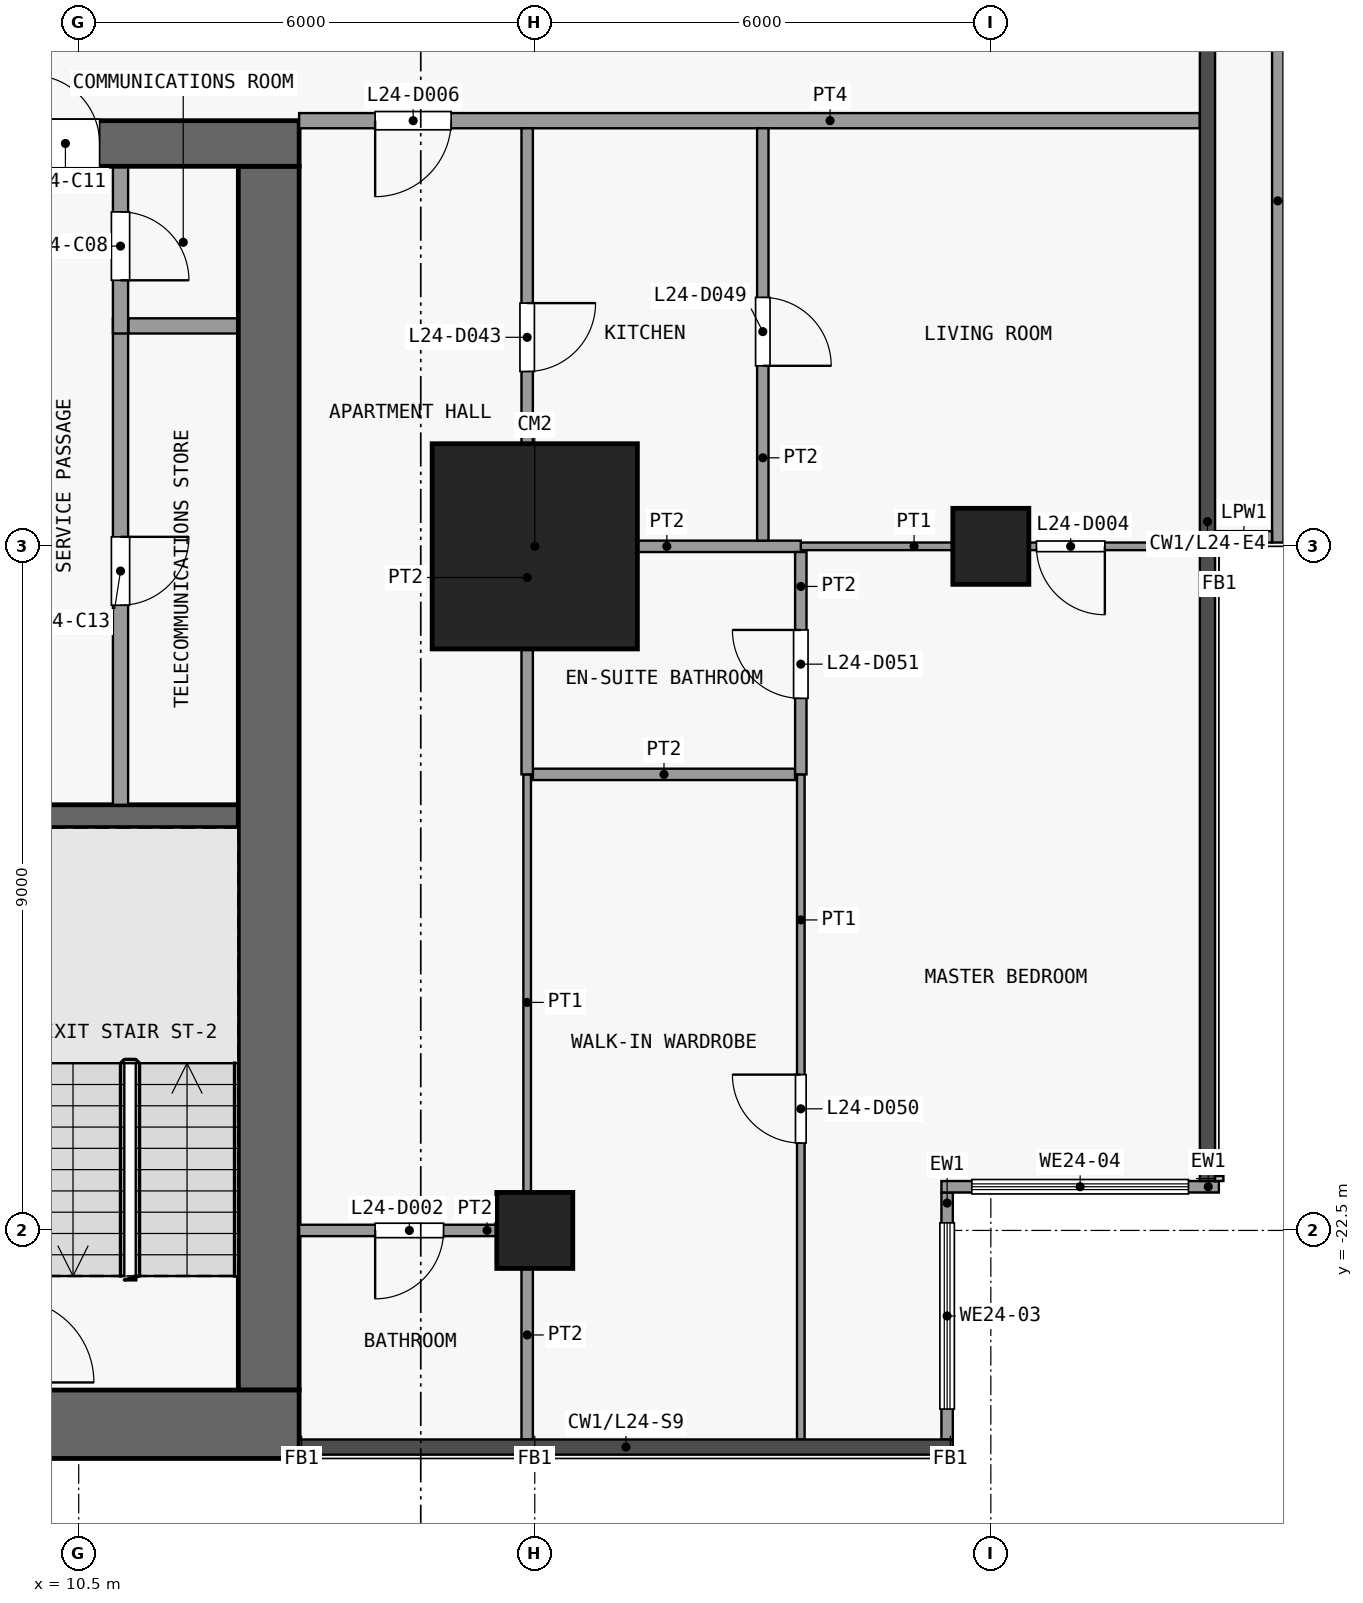
"""IFC4 building model, lengths in metres.
Left out: names, types, materials, properties, quantities, classifications, styles, units other than length and angle.
Written with IfcOpenShell. Run it as: python <this file> out.ifc"""

import sys

from ifc_helpers import new_model, si_unit, direction, frame, frame_2d, origin, origin_2d, place, context, subcontext, project, spatial, rectangle, extrude, element, fill, save


model = new_model("IFC4")
c1 = context("Model", 3, precision=1e-05, world=origin(), true_north=direction((0.0, 1.0)))
c2 = subcontext(c1, "Body", "Model", "MODEL_VIEW")
j1 = project(units=[si_unit("LENGTHUNIT", "METRE"), si_unit("PLANEANGLEUNIT", "RADIAN")], contexts=[c1])
p1 = place(None, origin())
s1 = spatial("IfcSite", under=j1, at=p1, CompositionType="ELEMENT")
p2 = place(p1, origin())
s2 = spatial("IfcBuilding", under=s1, at=p2, CompositionType="ELEMENT")
p3 = place(p2, frame((0.0, 0.0, 99.1)))
s3 = spatial("IfcBuildingStorey", under=s2, at=p3, CompositionType="ELEMENT", Elevation=99.1)
p4 = place(p3, frame((16.5, -22.5, 0.0), z_axis=(0.0, 0.0, 1.0), x_axis=(1.0, 0.0, 0.0)))
e1 = element("IfcColumn", 1, at=p4, inside=s3, PredefinedType="COLUMN", context=c2, shape_type="SweptSolid", body=[
    extrude(rectangle(XDim=1.0, YDim=1.0, at=origin_2d()), origin(), (0.0, 0.0, 1.0), 3.6),
])
p5 = place(p3, frame((16.5, -13.5, 0.0), z_axis=(0.0, 0.0, 1.0), x_axis=(1.0, 0.0, 0.0)))
e2 = element("IfcColumn", 2, at=p5, inside=s3, PredefinedType="COLUMN", context=c2, shape_type="SweptSolid", body=[
    extrude(rectangle(XDim=2.7, YDim=2.7, at=origin_2d()), origin(), (0.0, 0.0, 1.0), 3.6),
])
p6 = place(p3, frame((22.5, -13.5, 0.0), z_axis=(0.0, 0.0, 1.0), x_axis=(1.0, 0.0, 0.0)))
e3 = element("IfcColumn", 3, at=p6, inside=s3, PredefinedType="COLUMN", context=c2, shape_type="SweptSolid", body=[
    extrude(rectangle(XDim=1.0, YDim=1.0, at=origin_2d()), origin(), (0.0, 0.0, 1.0), 3.6),
])
p7 = place(p3, frame((-13.4, -25.05, 0.0), z_axis=(0.0, 0.0, 1.0), x_axis=(1.0, 0.0, 0.0)))
e4 = element("IfcWall", 4, at=p7, inside=s3, PredefinedType="SHEAR", context=c2, shape_type="SweptSolid", body=[
    extrude(rectangle(XDim=26.8, YDim=0.9, at=frame_2d((13.4, 0.0))), origin(), (0.0, 0.0, 1.0), 3.3),
])
p8 = place(p3, frame((-13.4, -8.2, 0.0), z_axis=(0.0, 0.0, 1.0), x_axis=(1.0, 0.0, 0.0)))
e5 = element("IfcWall", 5, at=p8, inside=s3, PredefinedType="SHEAR", context=c2, shape_type="SweptSolid", body=[
    extrude(rectangle(XDim=26.8, YDim=0.6, at=frame_2d((13.4, 0.0))), origin(), (0.0, 0.0, 1.0), 3.3),
])
p9 = place(p8, frame((7.7, 0.0, 0.0)))
e6 = element("IfcOpeningElement", 6, at=p9, cuts=e5, PredefinedType="OPENING", context=c2, shape_type="SweptSolid", body=[
    extrude(rectangle(XDim=1.8, YDim=2.1, at=frame_2d((0.9, 1.05))), frame((0.0, 0.31, 0.0), z_axis=(0.0, -1.0, 0.0), x_axis=(1.0, 0.0, 0.0)), (0.0, 0.0, 1.0), 0.62),
])
p10 = place(p8, frame((17.3, 0.0, 0.0)))
e7 = element("IfcOpeningElement", 7, at=p10, cuts=e5, PredefinedType="OPENING", context=c2, shape_type="SweptSolid", body=[
    extrude(rectangle(XDim=1.8, YDim=2.1, at=frame_2d((0.9, 1.05))), frame((0.0, 0.31, 0.0), z_axis=(0.0, -1.0, 0.0), x_axis=(1.0, 0.0, 0.0)), (0.0, 0.0, 1.0), 0.62),
])
p11 = place(p8, frame((2.625, 0.0, 0.0)))
e8 = element("IfcOpeningElement", 8, at=p11, cuts=e5, PredefinedType="OPENING", context=c2, shape_type="SweptSolid", body=[
    extrude(rectangle(XDim=0.9, YDim=2.1, at=frame_2d((0.45, 1.05))), frame((0.0, 0.31, 0.0), z_axis=(0.0, -1.0, 0.0), x_axis=(1.0, 0.0, 0.0)), (0.0, 0.0, 1.0), 0.62),
])
p12 = place(p8, frame((23.275, 0.0, 0.0)))
e9 = element("IfcOpeningElement", 9, at=p12, cuts=e5, PredefinedType="OPENING", context=c2, shape_type="SweptSolid", body=[
    extrude(rectangle(XDim=0.9, YDim=2.1, at=frame_2d((0.45, 1.05))), frame((0.0, 0.31, 0.0), z_axis=(0.0, -1.0, 0.0), x_axis=(1.0, 0.0, 0.0)), (0.0, 0.0, 1.0), 0.62),
])
p13 = place(p3, frame((13.0, -24.6, 0.0), z_axis=(0.0, 0.0, 1.0), x_axis=(0.0, 1.0, 0.0)))
e10 = element("IfcWall", 10, at=p13, inside=s3, PredefinedType="SHEAR", context=c2, shape_type="SweptSolid", body=[
    extrude(rectangle(XDim=16.1, YDim=0.8, at=frame_2d((8.05, 0.0))), origin(), (0.0, 0.0, 1.0), 3.3),
])
p14 = place(p3, frame((9.5, -17.05, 0.0), z_axis=(0.0, 0.0, 1.0), x_axis=(1.0, 0.0, 0.0)))
e11 = element("IfcWall", 11, at=p14, inside=s3, PredefinedType="SHEAR", context=c2, shape_type="SweptSolid", body=[
    extrude(rectangle(XDim=3.1, YDim=0.3, at=frame_2d((1.55, 0.0))), origin(), (0.0, 0.0, 1.0), 3.3),
])
p15 = place(p3, frame((11.15, -10.6, 0.0), z_axis=(0.0, 0.0, 1.0), x_axis=(1.0, 0.0, 0.0)))
e12 = element("IfcWall", 12, at=p15, inside=s3, PredefinedType="PARTITIONING", context=c2, shape_type="SweptSolid", body=[
    extrude(rectangle(XDim=1.45, YDim=0.2, at=frame_2d((0.725, 0.0))), origin(), (0.0, 0.0, 1.0), 3.3),
])
p16 = place(p3, frame((11.05, -10.5, 0.0), z_axis=(0.0, 0.0, 1.0), x_axis=(0.0, -1.0, 0.0)))
e13 = element("IfcWall", 13, at=p16, inside=s3, PredefinedType="PARTITIONING", context=c2, shape_type="SweptSolid", body=[
    extrude(rectangle(XDim=6.4, YDim=0.2, at=frame_2d((3.2, 0.0))), origin(), (0.0, 0.0, 1.0), 3.3),
])
p17 = place(p16, frame((2.875, 0.0, 0.0)))
e14 = element("IfcOpeningElement", 14, at=p17, cuts=e13, PredefinedType="OPENING", context=c2, shape_type="SweptSolid", body=[
    extrude(rectangle(XDim=0.9, YDim=2.1, at=frame_2d((0.45, 1.05))), frame((0.0, 0.11, 0.0), z_axis=(0.0, -1.0, 0.0), x_axis=(1.0, 0.0, 0.0)), (0.0, 0.0, 1.0), 0.22),
])
p18 = place(p3, frame((11.05, -8.5, 0.0), z_axis=(0.0, 0.0, 1.0), x_axis=(0.0, -1.0, 0.0)))
e15 = element("IfcWall", 15, at=p18, inside=s3, PredefinedType="PARTITIONING", context=c2, shape_type="SweptSolid", body=[
    extrude(rectangle(XDim=2.2, YDim=0.2, at=frame_2d((1.1, 0.0))), origin(), (0.0, 0.0, 1.0), 3.3),
])
p19 = place(p18, frame((0.6, 0.0, 0.0)))
e16 = element("IfcOpeningElement", 16, at=p19, cuts=e15, PredefinedType="OPENING", context=c2, shape_type="SweptSolid", body=[
    extrude(rectangle(XDim=0.9, YDim=2.1, at=frame_2d((0.45, 1.05))), frame((0.0, 0.11, 0.0), z_axis=(0.0, -1.0, 0.0), x_axis=(1.0, 0.0, 0.0)), (0.0, 0.0, 1.0), 0.22),
])
p20 = place(p3, frame((21.925, -22.0, 0.0), z_axis=(0.0, 0.0, 1.0), x_axis=(0.0, -1.0, 0.0)))
e17 = element("IfcWall", 17, at=p20, inside=s3, PredefinedType="SOLIDWALL", context=c2, shape_type="SweptSolid", body=[
    extrude(rectangle(XDim=3.25, YDim=0.15, at=frame_2d((1.625, 0.0))), origin(), (0.0, 0.0, 1.0), 3.3),
])
p21 = place(p20, frame((0.4, 0.0, 0.9)))
e18 = element("IfcOpeningElement", 18, at=p21, cuts=e17, PredefinedType="OPENING", context=c2, shape_type="SweptSolid", body=[
    extrude(rectangle(XDim=2.45, YDim=2.4, at=frame_2d((1.225, 1.2))), frame((0.0, 0.085, 0.0), z_axis=(0.0, -1.0, 0.0), x_axis=(1.0, 0.0, 0.0)), (0.0, 0.0, 1.0), 0.17),
])
p22 = place(p3, frame((25.5, -21.925, 0.0), z_axis=(0.0, 0.0, 1.0), x_axis=(-1.0, 0.0, 0.0)))
e19 = element("IfcWall", 19, at=p22, inside=s3, PredefinedType="SOLIDWALL", context=c2, shape_type="SweptSolid", body=[
    extrude(rectangle(XDim=3.65, YDim=0.15, at=frame_2d((1.825, 0.0))), origin(), (0.0, 0.0, 1.0), 3.3),
])
p23 = place(p22, frame((0.4, 0.0, 0.9)))
e20 = element("IfcOpeningElement", 20, at=p23, cuts=e19, PredefinedType="OPENING", context=c2, shape_type="SweptSolid", body=[
    extrude(rectangle(XDim=2.85, YDim=2.4, at=frame_2d((1.425, 1.2))), frame((0.0, 0.085, 0.0), z_axis=(0.0, -1.0, 0.0), x_axis=(1.0, 0.0, 0.0)), (0.0, 0.0, 1.0), 0.17),
])
p24 = place(p3, frame((26.275, -4.46, 0.0), z_axis=(0.0, 0.0, 1.0), x_axis=(0.0, -1.0, 0.0)))
e21 = element("IfcWall", 21, at=p24, inside=s3, PredefinedType="PARAPET", context=c2, shape_type="SweptSolid", body=[
    extrude(rectangle(XDim=8.99, YDim=0.15, at=frame_2d((4.495, 0.0))), origin(), (0.0, 0.0, 1.0), 1.15),
])
p25 = place(p3, frame((26.2, -13.375, 0.0), z_axis=(0.0, 0.0, 1.0), x_axis=(-1.0, 0.0, 0.0)))
e22 = element("IfcWall", 22, at=p25, inside=s3, PredefinedType="PARAPET", context=c2, shape_type="SweptSolid", body=[
    extrude(rectangle(XDim=0.74, YDim=0.15, at=frame_2d((0.37, 0.0))), origin(), (0.0, 0.0, 1.0), 1.15),
])
p26 = place(p3, frame((13.4, -22.5, 0.0), z_axis=(0.0, 0.0, 1.0), x_axis=(1.0, 0.0, 0.0)))
e23 = element("IfcWall", 23, at=p26, inside=s3, PredefinedType="PARTITIONING", context=c2, shape_type="SweptSolid", body=[
    extrude(rectangle(XDim=2.925, YDim=0.15, at=frame_2d((1.462, 0.0))), origin(), (0.0, 0.0, 1.0), 3.3),
])
p27 = place(p26, frame((1.0, 0.0, 0.0)))
e24 = element("IfcOpeningElement", 24, at=p27, cuts=e23, PredefinedType="OPENING", context=c2, shape_type="SweptSolid", body=[
    extrude(rectangle(XDim=0.9, YDim=2.1, at=frame_2d((0.45, 1.05))), frame((0.0, 0.085, 0.0), z_axis=(0.0, -1.0, 0.0), x_axis=(1.0, 0.0, 0.0)), (0.0, 0.0, 1.0), 0.17),
])
p28 = place(p3, frame((16.475, -16.5, 0.0), z_axis=(0.0, 0.0, 1.0), x_axis=(1.0, 0.0, 0.0)))
e25 = element("IfcWall", 25, at=p28, inside=s3, PredefinedType="PARTITIONING", context=c2, shape_type="SweptSolid", body=[
    extrude(rectangle(XDim=3.45, YDim=0.15, at=frame_2d((1.725, 0.0))), origin(), (0.0, 0.0, 1.0), 3.3),
])
p29 = place(p3, frame((20.0, -13.5, 0.0), z_axis=(0.0, 0.0, 1.0), x_axis=(1.0, 0.0, 0.0)))
e26 = element("IfcWall", 26, at=p29, inside=s3, PredefinedType="PARTITIONING", context=c2, shape_type="SweptSolid", body=[
    extrude(rectangle(XDim=5.25, YDim=0.1, at=frame_2d((2.625, 0.0))), origin(), (0.0, 0.0, 1.0), 3.3),
])
p30 = place(p29, frame((3.1, 0.0, 0.0)))
e27 = element("IfcOpeningElement", 27, at=p30, cuts=e26, PredefinedType="OPENING", context=c2, shape_type="SweptSolid", body=[
    extrude(rectangle(XDim=0.9, YDim=2.1, at=frame_2d((0.45, 1.05))), frame((0.0, 0.06, 0.0), z_axis=(0.0, -1.0, 0.0), x_axis=(1.0, 0.0, 0.0)), (0.0, 0.0, 1.0), 0.12),
])
p31 = place(p3, frame((16.475, -13.5, 0.0), z_axis=(0.0, 0.0, 1.0), x_axis=(1.0, 0.0, 0.0)))
e28 = element("IfcWall", 28, at=p31, inside=s3, PredefinedType="PARTITIONING", context=c2, shape_type="SweptSolid", body=[
    extrude(rectangle(XDim=3.525, YDim=0.15, at=frame_2d((1.762, 0.0))), origin(), (0.0, 0.0, 1.0), 3.3),
])
p32 = place(p3, frame((13.4, -7.9, 0.0), z_axis=(0.0, 0.0, 1.0), x_axis=(1.0, 0.0, 0.0)))
e29 = element("IfcWall", 29, at=p32, inside=s3, PredefinedType="PARTITIONING", context=c2, shape_type="SweptSolid", body=[
    extrude(rectangle(XDim=11.85, YDim=0.2, at=frame_2d((5.925, 0.0))), origin(), (0.0, 0.0, 1.0), 3.3),
])
p33 = place(p32, frame((1.0, 0.0, 0.0)))
e30 = element("IfcOpeningElement", 30, at=p33, cuts=e29, PredefinedType="OPENING", context=c2, shape_type="SweptSolid", body=[
    extrude(rectangle(XDim=1.0, YDim=2.1, at=frame_2d((0.5, 1.05))), frame((0.0, 0.11, 0.0), z_axis=(0.0, -1.0, 0.0), x_axis=(1.0, 0.0, 0.0)), (0.0, 0.0, 1.0), 0.22),
])
p34 = place(p3, frame((16.4, -22.5, 0.0), z_axis=(0.0, 0.0, 1.0), x_axis=(0.0, 1.0, 0.0)))
e31 = element("IfcWall", 31, at=p34, inside=s3, PredefinedType="PARTITIONING", context=c2, shape_type="SweptSolid", body=[
    extrude(rectangle(XDim=6.0, YDim=0.1, at=frame_2d((3.0, 0.0))), origin(), (0.0, 0.0, 1.0), 3.3),
])
p35 = place(p3, frame((16.4, -25.25, 0.0), z_axis=(0.0, 0.0, 1.0), x_axis=(0.0, 1.0, 0.0)))
e32 = element("IfcWall", 32, at=p35, inside=s3, PredefinedType="PARTITIONING", context=c2, shape_type="SweptSolid", body=[
    extrude(rectangle(XDim=2.75, YDim=0.15, at=frame_2d((1.375, 0.0))), origin(), (0.0, 0.0, 1.0), 3.3),
])
p36 = place(p3, frame((16.4, -16.5, 0.0), z_axis=(0.0, 0.0, 1.0), x_axis=(0.0, 1.0, 0.0)))
e33 = element("IfcWall", 33, at=p36, inside=s3, PredefinedType="PARTITIONING", context=c2, shape_type="SweptSolid", body=[
    extrude(rectangle(XDim=8.5, YDim=0.15, at=frame_2d((4.25, 0.0))), origin(), (0.0, 0.0, 1.0), 3.3),
])
p37 = place(p36, frame((5.3, 0.0, 0.0)))
e34 = element("IfcOpeningElement", 34, at=p37, cuts=e33, PredefinedType="OPENING", context=c2, shape_type="SweptSolid", body=[
    extrude(rectangle(XDim=0.9, YDim=2.1, at=frame_2d((0.45, 1.05))), frame((0.0, 0.085, 0.0), z_axis=(0.0, -1.0, 0.0), x_axis=(1.0, 0.0, 0.0)), (0.0, 0.0, 1.0), 0.17),
])
p38 = place(p3, frame((19.5, -13.425, 0.0), z_axis=(0.0, 0.0, 1.0), x_axis=(0.0, 1.0, 0.0)))
e35 = element("IfcWall", 35, at=p38, inside=s3, PredefinedType="PARTITIONING", context=c2, shape_type="SweptSolid", body=[
    extrude(rectangle(XDim=5.425, YDim=0.15, at=frame_2d((2.712, 0.0))), origin(), (0.0, 0.0, 1.0), 3.3),
])
p39 = place(p38, frame((2.3, 0.0, 0.0)))
e36 = element("IfcOpeningElement", 36, at=p39, cuts=e35, PredefinedType="OPENING", context=c2, shape_type="SweptSolid", body=[
    extrude(rectangle(XDim=0.9, YDim=2.1, at=frame_2d((0.45, 1.05))), frame((0.0, 0.085, 0.0), z_axis=(0.0, -1.0, 0.0), x_axis=(1.0, 0.0, 0.0)), (0.0, 0.0, 1.0), 0.17),
])
p40 = place(p3, frame((20.0, -25.25, 0.0), z_axis=(0.0, 0.0, 1.0), x_axis=(0.0, 1.0, 0.0)))
e37 = element("IfcWall", 37, at=p40, inside=s3, PredefinedType="PARTITIONING", context=c2, shape_type="SweptSolid", body=[
    extrude(rectangle(XDim=8.75, YDim=0.1, at=frame_2d((4.375, 0.0))), origin(), (0.0, 0.0, 1.0), 3.3),
])
p41 = place(p40, frame((3.9, 0.0, 0.0)))
e38 = element("IfcOpeningElement", 38, at=p41, cuts=e37, PredefinedType="OPENING", context=c2, shape_type="SweptSolid", body=[
    extrude(rectangle(XDim=0.9, YDim=2.1, at=frame_2d((0.45, 1.05))), frame((0.0, 0.06, 0.0), z_axis=(0.0, -1.0, 0.0), x_axis=(1.0, 0.0, 0.0)), (0.0, 0.0, 1.0), 0.12),
])
p42 = place(p3, frame((20.0, -16.5, 0.0), z_axis=(0.0, 0.0, 1.0), x_axis=(0.0, 1.0, 0.0)))
e39 = element("IfcWall", 39, at=p42, inside=s3, PredefinedType="PARTITIONING", context=c2, shape_type="SweptSolid", body=[
    extrude(rectangle(XDim=2.925, YDim=0.15, at=frame_2d((1.462, 0.0))), origin(), (0.0, 0.0, 1.0), 3.3),
])
p43 = place(p42, frame((1.0, 0.0, 0.0)))
e40 = element("IfcOpeningElement", 40, at=p43, cuts=e39, PredefinedType="OPENING", context=c2, shape_type="SweptSolid", body=[
    extrude(rectangle(XDim=0.9, YDim=2.1, at=frame_2d((0.45, 1.05))), frame((0.0, 0.085, 0.0), z_axis=(0.0, -1.0, 0.0), x_axis=(1.0, 0.0, 0.0)), (0.0, 0.0, 1.0), 0.17),
])
p44 = place(p19, origin())
e41 = element("IfcDoor", 41, at=p44, inside=s3, OperationType="SINGLE_SWING_RIGHT", PredefinedType="DOOR", context=c2, shape_type="SweptSolid", body=[
    extrude(rectangle(XDim=0.9, YDim=2.1, at=frame_2d((0.45, 1.05))), frame((0.0, 0.025, 0.0), z_axis=(0.0, -1.0, 0.0), x_axis=(1.0, 0.0, 0.0)), (0.0, 0.0, 1.0), 0.05),
])
fill(e16, e41)
p45 = place(p12, origin())
e42 = element("IfcDoor", 42, at=p45, inside=s3, OperationType="SINGLE_SWING_LEFT", PredefinedType="DOOR", context=c2, shape_type="SweptSolid", body=[
    extrude(rectangle(XDim=0.9, YDim=2.1, at=frame_2d((0.45, 1.05))), frame((0.0, 0.025, 0.0), z_axis=(0.0, -1.0, 0.0), x_axis=(1.0, 0.0, 0.0)), (0.0, 0.0, 1.0), 0.05),
])
fill(e9, e42)
p46 = place(p17, origin())
e43 = element("IfcDoor", 43, at=p46, inside=s3, OperationType="SINGLE_SWING_LEFT", PredefinedType="DOOR", context=c2, shape_type="SweptSolid", body=[
    extrude(rectangle(XDim=0.9, YDim=2.1, at=frame_2d((0.45, 1.05))), frame((0.0, 0.025, 0.0), z_axis=(0.0, -1.0, 0.0), x_axis=(1.0, 0.0, 0.0)), (0.0, 0.0, 1.0), 0.05),
])
fill(e14, e43)
p47 = place(p21, origin())
e44 = element("IfcWindow", 44, at=p47, inside=s3, PartitioningType="SINGLE_PANEL", PredefinedType="WINDOW", context=c2, shape_type="SweptSolid", body=[
    extrude(rectangle(XDim=2.45, YDim=2.4, at=frame_2d((1.225, 1.2))), frame((0.0, 0.03, 0.0), z_axis=(0.0, -1.0, 0.0), x_axis=(1.0, 0.0, 0.0)), (0.0, 0.0, 1.0), 0.06),
])
fill(e18, e44)
p48 = place(p23, origin())
e45 = element("IfcWindow", 45, at=p48, inside=s3, PartitioningType="SINGLE_PANEL", PredefinedType="WINDOW", context=c2, shape_type="SweptSolid", body=[
    extrude(rectangle(XDim=2.85, YDim=2.4, at=frame_2d((1.425, 1.2))), frame((0.0, 0.03, 0.0), z_axis=(0.0, -1.0, 0.0), x_axis=(1.0, 0.0, 0.0)), (0.0, 0.0, 1.0), 0.06),
])
fill(e20, e45)
p49 = place(p27, origin())
e46 = element("IfcDoor", 46, at=p49, inside=s3, OperationType="SINGLE_SWING_LEFT", PredefinedType="DOOR", context=c2, shape_type="SweptSolid", body=[
    extrude(rectangle(XDim=0.9, YDim=2.1, at=frame_2d((0.45, 1.05))), frame((0.0, 0.025, 0.0), z_axis=(0.0, -1.0, 0.0), x_axis=(1.0, 0.0, 0.0)), (0.0, 0.0, 1.0), 0.05),
])
fill(e24, e46)
p50 = place(p30, origin())
e47 = element("IfcDoor", 47, at=p50, inside=s3, OperationType="SINGLE_SWING_RIGHT", PredefinedType="DOOR", context=c2, shape_type="SweptSolid", body=[
    extrude(rectangle(XDim=0.9, YDim=2.1, at=frame_2d((0.45, 1.05))), frame((0.0, 0.025, 0.0), z_axis=(0.0, -1.0, 0.0), x_axis=(1.0, 0.0, 0.0)), (0.0, 0.0, 1.0), 0.05),
])
fill(e27, e47)
p51 = place(p33, origin())
e48 = element("IfcDoor", 48, at=p51, inside=s3, OperationType="SINGLE_SWING_LEFT", PredefinedType="DOOR", context=c2, shape_type="SweptSolid", body=[
    extrude(rectangle(XDim=1.0, YDim=2.1, at=frame_2d((0.5, 1.05))), frame((0.0, 0.025, 0.0), z_axis=(0.0, -1.0, 0.0), x_axis=(1.0, 0.0, 0.0)), (0.0, 0.0, 1.0), 0.05),
])
fill(e30, e48)
p52 = place(p37, origin())
e49 = element("IfcDoor", 49, at=p52, inside=s3, OperationType="SINGLE_SWING_RIGHT", PredefinedType="DOOR", context=c2, shape_type="SweptSolid", body=[
    extrude(rectangle(XDim=0.9, YDim=2.1, at=frame_2d((0.45, 1.05))), frame((0.0, 0.025, 0.0), z_axis=(0.0, -1.0, 0.0), x_axis=(1.0, 0.0, 0.0)), (0.0, 0.0, 1.0), 0.05),
])
fill(e34, e49)
p53 = place(p39, origin())
e50 = element("IfcDoor", 50, at=p53, inside=s3, OperationType="SINGLE_SWING_LEFT", PredefinedType="DOOR", context=c2, shape_type="SweptSolid", body=[
    extrude(rectangle(XDim=0.9, YDim=2.1, at=frame_2d((0.45, 1.05))), frame((0.0, 0.025, 0.0), z_axis=(0.0, -1.0, 0.0), x_axis=(1.0, 0.0, 0.0)), (0.0, 0.0, 1.0), 0.05),
])
fill(e36, e50)
p54 = place(p41, origin())
e51 = element("IfcDoor", 51, at=p54, inside=s3, OperationType="SINGLE_SWING_LEFT", PredefinedType="DOOR", context=c2, shape_type="SweptSolid", body=[
    extrude(rectangle(XDim=0.9, YDim=2.1, at=frame_2d((0.45, 1.05))), frame((0.0, 0.025, 0.0), z_axis=(0.0, -1.0, 0.0), x_axis=(1.0, 0.0, 0.0)), (0.0, 0.0, 1.0), 0.05),
])
fill(e38, e51)
p55 = place(p43, origin())
e52 = element("IfcDoor", 52, at=p55, inside=s3, OperationType="SINGLE_SWING_LEFT", PredefinedType="DOOR", context=c2, shape_type="SweptSolid", body=[
    extrude(rectangle(XDim=0.9, YDim=2.1, at=frame_2d((0.45, 1.05))), frame((0.0, 0.025, 0.0), z_axis=(0.0, -1.0, 0.0), x_axis=(1.0, 0.0, 0.0)), (0.0, 0.0, 1.0), 0.05),
])
fill(e40, e52)
save(model, sys.argv[1])
